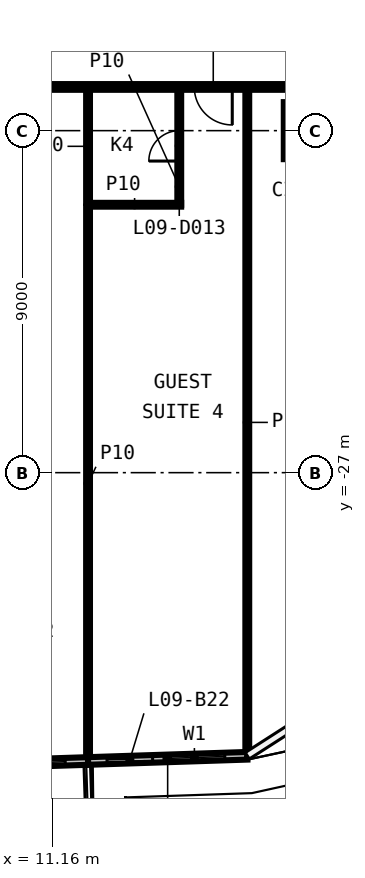
"""IFC4 building model, lengths in metres.
Left out: names, types, materials, properties, quantities, classifications, styles, units other than length and angle.
Written with IfcOpenShell. Run it as: python <this file> out.ifc"""

import sys

from ifc_helpers import new_model, si_unit, direction, frame, frame_2d, origin, origin_2d, place, context, subcontext, project, spatial, rectangle, extrude, element, fill, save


model = new_model("IFC4")
c1 = context("Model", 3, precision=1e-05, world=origin(), true_north=direction((0.0, 1.0)))
c2 = subcontext(c1, "Body", "Model", "MODEL_VIEW")
j1 = project(units=[si_unit("LENGTHUNIT", "METRE"), si_unit("PLANEANGLEUNIT", "RADIAN")], contexts=[c1])
p1 = place(None, origin())
s1 = spatial("IfcSite", under=j1, at=p1, CompositionType="ELEMENT")
p2 = place(p1, origin())
s2 = spatial("IfcBuilding", under=s1, at=p2, CompositionType="ELEMENT")
p3 = place(p2, frame((0.0, 0.0, 55.1)))
s3 = spatial("IfcBuildingStorey", under=s2, at=p3, CompositionType="ELEMENT", Elevation=55.1)
p4 = place(p3, frame((18.0, -18.0, 0.0), z_axis=(0.0, 0.0, 1.0), x_axis=(1.0, 0.0, 0.0)))
e1 = element("IfcColumn", 1, at=p4, inside=s3, PredefinedType="COLUMN", context=c2, shape_type="SweptSolid", body=[
    extrude(rectangle(XDim=1.5, YDim=1.5, at=origin_2d()), origin(), (0.0, 0.0, 1.0), 3.3),
])
p5 = place(p3, frame((12.099, -19.95, 0.0), z_axis=(0.0, 0.0, 1.0), x_axis=(1.0, 0.0, 0.0)))
e2 = element("IfcWall", 2, at=p5, inside=s3, PredefinedType="PARTITIONING", context=c2, shape_type="SweptSolid", body=[
    extrude(rectangle(XDim=2.45, YDim=0.1, at=frame_2d((1.225, 0.0))), origin(), (0.0, 0.0, 1.0), 3.3),
])
p6 = place(p3, frame((19.925, -16.85, 0.0), z_axis=(0.0, 0.0, 1.0), x_axis=(-1.0, 0.0, 0.0)))
e3 = element("IfcWall", 3, at=p6, inside=s3, PredefinedType="PARTITIONING", context=c2, shape_type="SweptSolid", body=[
    extrude(rectangle(XDim=39.85, YDim=0.15, at=frame_2d((19.925, 0.0))), origin(), (0.0, 0.0, 1.0), 3.3),
])
p7 = place(p6, frame((35.041, 0.0, 0.0)))
e4 = element("IfcOpeningElement", 4, at=p7, cuts=e3, PredefinedType="OPENING", context=c2, shape_type="SweptSolid", body=[
    extrude(rectangle(XDim=0.9, YDim=2.1, at=frame_2d((0.45, 1.05))), frame((0.0, 0.085, 0.0), z_axis=(0.0, -1.0, 0.0), x_axis=(1.0, 0.0, 0.0)), (0.0, 0.0, 1.0), 0.17),
])
p8 = place(p6, frame((31.0, 0.0, 0.0)))
e5 = element("IfcOpeningElement", 5, at=p8, cuts=e3, PredefinedType="OPENING", context=c2, shape_type="SweptSolid", body=[
    extrude(rectangle(XDim=1.0, YDim=2.1, at=frame_2d((0.5, 1.05))), frame((0.0, 0.085, 0.0), z_axis=(0.0, -1.0, 0.0), x_axis=(1.0, 0.0, 0.0)), (0.0, 0.0, 1.0), 0.17),
])
p9 = place(p6, frame((25.711, 0.0, 0.0)))
e6 = element("IfcOpeningElement", 6, at=p9, cuts=e3, PredefinedType="OPENING", context=c2, shape_type="SweptSolid", body=[
    extrude(rectangle(XDim=0.9, YDim=2.1, at=frame_2d((0.45, 1.05))), frame((0.0, 0.085, 0.0), z_axis=(0.0, -1.0, 0.0), x_axis=(1.0, 0.0, 0.0)), (0.0, 0.0, 1.0), 0.17),
])
p10 = place(p6, frame((22.072, 0.0, 0.0)))
e7 = element("IfcOpeningElement", 7, at=p10, cuts=e3, PredefinedType="OPENING", context=c2, shape_type="SweptSolid", body=[
    extrude(rectangle(XDim=0.9, YDim=2.1, at=frame_2d((0.45, 1.05))), frame((0.0, 0.085, 0.0), z_axis=(0.0, -1.0, 0.0), x_axis=(1.0, 0.0, 0.0)), (0.0, 0.0, 1.0), 0.17),
])
p11 = place(p6, frame((17.034, 0.0, 0.0)))
e8 = element("IfcOpeningElement", 8, at=p11, cuts=e3, PredefinedType="OPENING", context=c2, shape_type="SweptSolid", body=[
    extrude(rectangle(XDim=0.9, YDim=2.1, at=frame_2d((0.45, 1.05))), frame((0.0, 0.085, 0.0), z_axis=(0.0, -1.0, 0.0), x_axis=(1.0, 0.0, 0.0)), (0.0, 0.0, 1.0), 0.17),
])
p12 = place(p6, frame((13.675, 0.0, 0.0)))
e9 = element("IfcOpeningElement", 9, at=p12, cuts=e3, PredefinedType="OPENING", context=c2, shape_type="SweptSolid", body=[
    extrude(rectangle(XDim=0.9, YDim=2.1, at=frame_2d((0.45, 1.05))), frame((0.0, 0.085, 0.0), z_axis=(0.0, -1.0, 0.0), x_axis=(1.0, 0.0, 0.0)), (0.0, 0.0, 1.0), 0.17),
])
p13 = place(p6, frame((4.031, 0.0, 0.0)))
e10 = element("IfcOpeningElement", 10, at=p13, cuts=e3, PredefinedType="OPENING", context=c2, shape_type="SweptSolid", body=[
    extrude(rectangle(XDim=1.0, YDim=2.1, at=frame_2d((0.5, 1.05))), frame((0.0, 0.085, 0.0), z_axis=(0.0, -1.0, 0.0), x_axis=(1.0, 0.0, 0.0)), (0.0, 0.0, 1.0), 0.17),
])
p14 = place(p3, frame((16.289, -34.43, 0.0), z_axis=(0.0, 0.0, 1.0), x_axis=(0.0, 1.0, 0.0)))
e11 = element("IfcWall", 11, at=p14, inside=s3, PredefinedType="PARTITIONING", context=c2, shape_type="SweptSolid", body=[
    extrude(rectangle(XDim=17.505, YDim=0.1, at=frame_2d((8.752, 0.0))), origin(), (0.0, 0.0, 1.0), 3.3),
])
p15 = place(p3, frame((14.499, -19.95, 0.0), z_axis=(0.0, 0.0, 1.0), x_axis=(0.0, 1.0, 0.0)))
e12 = element("IfcWall", 12, at=p15, inside=s3, PredefinedType="PARTITIONING", context=c2, shape_type="SweptSolid", body=[
    extrude(rectangle(XDim=3.025, YDim=0.1, at=frame_2d((1.512, 0.0))), origin(), (0.0, 0.0, 1.0), 3.3),
])
p16 = place(p15, frame((1.15, 0.0, 0.0)))
e13 = element("IfcOpeningElement", 13, at=p16, cuts=e12, PredefinedType="OPENING", context=c2, shape_type="SweptSolid", body=[
    extrude(rectangle(XDim=0.8, YDim=2.1, at=frame_2d((0.4, 1.05))), frame((0.0, 0.06, 0.0), z_axis=(0.0, -1.0, 0.0), x_axis=(1.0, 0.0, 0.0)), (0.0, 0.0, 1.0), 0.12),
])
p17 = place(p3, frame((12.099, -34.567, 0.0), z_axis=(0.0, 0.0, 1.0), x_axis=(0.0, 1.0, 0.0)))
e14 = element("IfcWall", 14, at=p17, inside=s3, PredefinedType="PARTITIONING", context=c2, shape_type="SweptSolid", body=[
    extrude(rectangle(XDim=14.567, YDim=0.1, at=frame_2d((7.284, 0.0))), origin(), (0.0, 0.0, 1.0), 3.3),
])
p18 = place(p3, frame((12.099, -19.9, 0.0), z_axis=(0.0, 0.0, 1.0), x_axis=(0.0, 1.0, 0.0)))
e15 = element("IfcWall", 15, at=p18, inside=s3, PredefinedType="PARTITIONING", context=c2, shape_type="SweptSolid", body=[
    extrude(rectangle(XDim=2.975, YDim=0.1, at=frame_2d((1.487, 0.0))), origin(), (0.0, 0.0, 1.0), 3.3),
])
p19 = place(p3, frame((-4.697, -35.136, 0.0), z_axis=(0.0, 0.0, 1.0), x_axis=(0.999466983916, 0.032645796998, 0.0)))
e16 = element("IfcWall", 16, at=p19, inside=s3, PredefinedType="SOLIDWALL", context=c2, shape_type="SweptSolid", body=[
    extrude(rectangle(XDim=16.804, YDim=0.2, at=frame_2d((8.402, 0.0))), origin(), (0.0, 0.0, 1.0), 3.3),
])
p20 = place(p19, frame((2.0, 0.0, 0.6)))
e17 = element("IfcOpeningElement", 17, at=p20, cuts=e16, PredefinedType="OPENING", context=c2, shape_type="SweptSolid", body=[
    extrude(rectangle(XDim=1.6, YDim=2.4, at=frame_2d((0.8, 1.2))), frame((0.0, 0.11, 0.0), z_axis=(0.0, -1.0, 0.0), x_axis=(1.0, 0.0, 0.0)), (0.0, 0.0, 1.0), 0.22),
])
p21 = place(p19, frame((0.5, 0.0, 0.0)))
e18 = element("IfcOpeningElement", 18, at=p21, cuts=e16, PredefinedType="OPENING", context=c2, shape_type="SweptSolid", body=[
    extrude(rectangle(XDim=1.2, YDim=2.4, at=frame_2d((0.6, 1.2))), frame((0.0, 0.11, 0.0), z_axis=(0.0, -1.0, 0.0), x_axis=(1.0, 0.0, 0.0)), (0.0, 0.0, 1.0), 0.22),
])
p22 = place(p19, frame((6.201, 0.0, 0.6)))
e19 = element("IfcOpeningElement", 19, at=p22, cuts=e16, PredefinedType="OPENING", context=c2, shape_type="SweptSolid", body=[
    extrude(rectangle(XDim=1.6, YDim=2.4, at=frame_2d((0.8, 1.2))), frame((0.0, 0.11, 0.0), z_axis=(0.0, -1.0, 0.0), x_axis=(1.0, 0.0, 0.0)), (0.0, 0.0, 1.0), 0.22),
])
p23 = place(p19, frame((4.701, 0.0, 0.0)))
e20 = element("IfcOpeningElement", 20, at=p23, cuts=e16, PredefinedType="OPENING", context=c2, shape_type="SweptSolid", body=[
    extrude(rectangle(XDim=1.2, YDim=2.4, at=frame_2d((0.6, 1.2))), frame((0.0, 0.11, 0.0), z_axis=(0.0, -1.0, 0.0), x_axis=(1.0, 0.0, 0.0)), (0.0, 0.0, 1.0), 0.22),
])
p24 = place(p19, frame((10.402, 0.0, 0.6)))
e21 = element("IfcOpeningElement", 21, at=p24, cuts=e16, PredefinedType="OPENING", context=c2, shape_type="SweptSolid", body=[
    extrude(rectangle(XDim=1.6, YDim=2.4, at=frame_2d((0.8, 1.2))), frame((0.0, 0.11, 0.0), z_axis=(0.0, -1.0, 0.0), x_axis=(1.0, 0.0, 0.0)), (0.0, 0.0, 1.0), 0.22),
])
p25 = place(p19, frame((8.902, 0.0, 0.0)))
e22 = element("IfcOpeningElement", 22, at=p25, cuts=e16, PredefinedType="OPENING", context=c2, shape_type="SweptSolid", body=[
    extrude(rectangle(XDim=1.2, YDim=2.4, at=frame_2d((0.6, 1.2))), frame((0.0, 0.11, 0.0), z_axis=(0.0, -1.0, 0.0), x_axis=(1.0, 0.0, 0.0)), (0.0, 0.0, 1.0), 0.22),
])
p26 = place(p19, frame((14.603, 0.0, 0.6)))
e23 = element("IfcOpeningElement", 23, at=p26, cuts=e16, PredefinedType="OPENING", context=c2, shape_type="SweptSolid", body=[
    extrude(rectangle(XDim=1.6, YDim=2.4, at=frame_2d((0.8, 1.2))), frame((0.0, 0.11, 0.0), z_axis=(0.0, -1.0, 0.0), x_axis=(1.0, 0.0, 0.0)), (0.0, 0.0, 1.0), 0.22),
])
p27 = place(p19, frame((12.903, 0.0, 0.0)))
e24 = element("IfcOpeningElement", 24, at=p27, cuts=e16, PredefinedType="OPENING", context=c2, shape_type="SweptSolid", body=[
    extrude(rectangle(XDim=1.2, YDim=2.4, at=frame_2d((0.6, 1.2))), frame((0.0, 0.11, 0.0), z_axis=(0.0, -1.0, 0.0), x_axis=(1.0, 0.0, 0.0)), (0.0, 0.0, 1.0), 0.22),
])
p28 = place(p3, frame((12.099, -34.587, 0.0), z_axis=(0.0, 0.0, 1.0), x_axis=(0.999468058802, 0.032612872214, 0.0)))
e25 = element("IfcWall", 25, at=p28, inside=s3, PredefinedType="SOLIDWALL", context=c2, shape_type="SweptSolid", body=[
    extrude(rectangle(XDim=4.192, YDim=0.2, at=frame_2d((2.096, 0.0))), origin(), (0.0, 0.0, 1.0), 3.3),
])
p29 = place(p28, frame((2.0, 0.0, 0.6)))
e26 = element("IfcOpeningElement", 26, at=p29, cuts=e25, PredefinedType="OPENING", context=c2, shape_type="SweptSolid", body=[
    extrude(rectangle(XDim=1.6, YDim=2.4, at=frame_2d((0.8, 1.2))), frame((0.0, 0.11, 0.0), z_axis=(0.0, -1.0, 0.0), x_axis=(1.0, 0.0, 0.0)), (0.0, 0.0, 1.0), 0.22),
])
p30 = place(p28, frame((0.5, 0.0, 0.0)))
e27 = element("IfcOpeningElement", 27, at=p30, cuts=e25, PredefinedType="OPENING", context=c2, shape_type="SweptSolid", body=[
    extrude(rectangle(XDim=1.2, YDim=2.4, at=frame_2d((0.6, 1.2))), frame((0.0, 0.11, 0.0), z_axis=(0.0, -1.0, 0.0), x_axis=(1.0, 0.0, 0.0)), (0.0, 0.0, 1.0), 0.22),
])
p31 = place(p16, origin())
e28 = element("IfcDoor", 28, at=p31, inside=s3, OperationType="SINGLE_SWING_LEFT", PredefinedType="DOOR", context=c2, shape_type="SweptSolid", body=[
    extrude(rectangle(XDim=0.8, YDim=2.1, at=frame_2d((0.4, 1.05))), frame((0.0, 0.025, 0.0), z_axis=(0.0, -1.0, 0.0), x_axis=(1.0, 0.0, 0.0)), (0.0, 0.0, 1.0), 0.05),
])
fill(e13, e28)
p32 = place(p13, origin())
e29 = element("IfcDoor", 29, at=p32, inside=s3, OperationType="SINGLE_SWING_RIGHT", PredefinedType="DOOR", context=c2, shape_type="SweptSolid", body=[
    extrude(rectangle(XDim=1.0, YDim=2.1, at=frame_2d((0.5, 1.05))), frame((0.0, 0.025, 0.0), z_axis=(0.0, -1.0, 0.0), x_axis=(1.0, 0.0, 0.0)), (0.0, 0.0, 1.0), 0.05),
])
fill(e10, e29)
p33 = place(p26, origin())
e30 = element("IfcWindow", 30, at=p33, inside=s3, PartitioningType="SINGLE_PANEL", PredefinedType="WINDOW", context=c2, shape_type="SweptSolid", body=[
    extrude(rectangle(XDim=1.6, YDim=2.4, at=frame_2d((0.8, 1.2))), frame((0.0, 0.03, 0.0), z_axis=(0.0, -1.0, 0.0), x_axis=(1.0, 0.0, 0.0)), (0.0, 0.0, 1.0), 0.06),
])
fill(e23, e30)
p34 = place(p29, origin())
e31 = element("IfcWindow", 31, at=p34, inside=s3, PartitioningType="SINGLE_PANEL", PredefinedType="WINDOW", context=c2, shape_type="SweptSolid", body=[
    extrude(rectangle(XDim=1.6, YDim=2.4, at=frame_2d((0.8, 1.2))), frame((0.0, 0.03, 0.0), z_axis=(0.0, -1.0, 0.0), x_axis=(1.0, 0.0, 0.0)), (0.0, 0.0, 1.0), 0.06),
])
fill(e26, e31)
p35 = place(p30, origin())
e32 = element("IfcDoor", 32, at=p35, inside=s3, OperationType="SLIDING_TO_LEFT", PredefinedType="DOOR", context=c2, shape_type="SweptSolid", body=[
    extrude(rectangle(XDim=1.2, YDim=2.4, at=frame_2d((0.6, 1.2))), frame((0.0, 0.025, 0.0), z_axis=(0.0, -1.0, 0.0), x_axis=(1.0, 0.0, 0.0)), (0.0, 0.0, 1.0), 0.05),
])
fill(e27, e32)
save(model, sys.argv[1])
